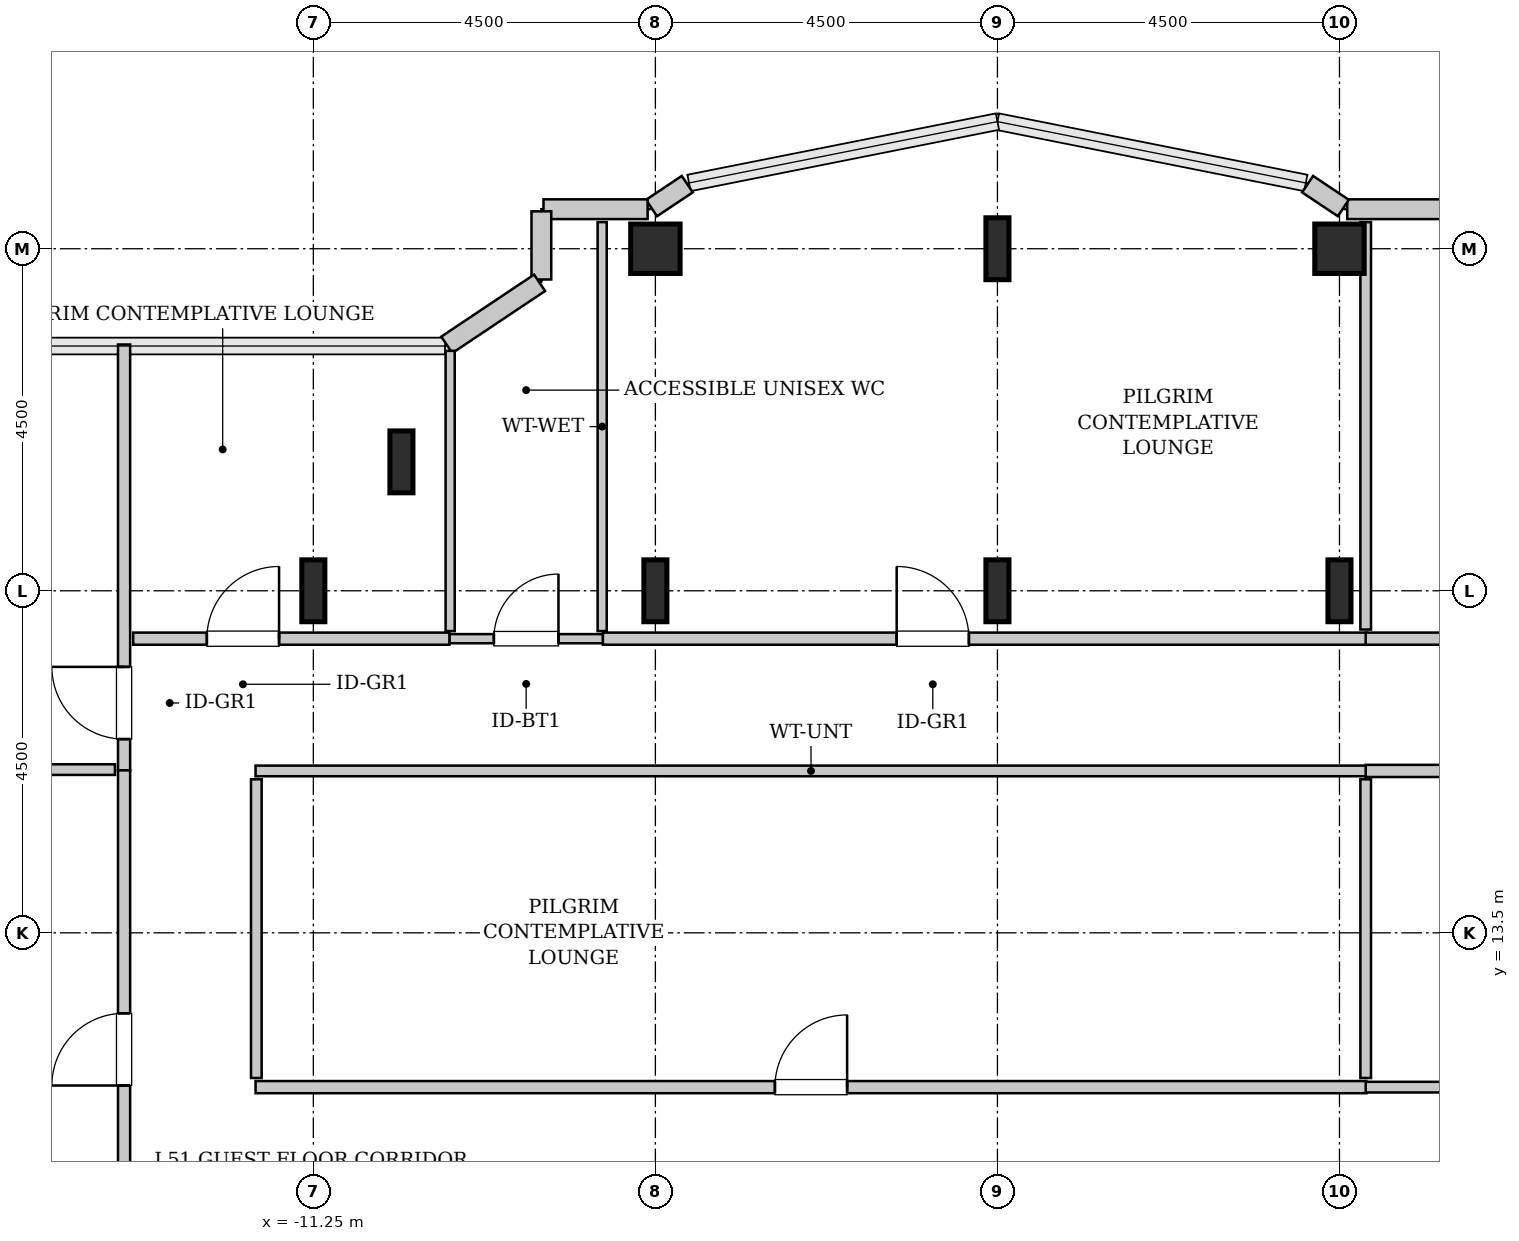
"""IFC4 building model, lengths in metres.
Left out: names, types, materials, properties, quantities, classifications, styles, units other than length and angle.
Written with IfcOpenShell. Run it as: python <this file> out.ifc"""

import sys

from ifc_helpers import new_model, si_unit, direction, frame, frame_2d, origin, origin_2d, place, context, subcontext, project, spatial, rectangle, hollow_rectangle, i_section, extrude, source, transform, mapped, element, fill, save


model = new_model("IFC4")
c1 = context("Model", 3, precision=1e-05, world=origin(), true_north=direction((0.0, 1.0)))
c2 = subcontext(c1, "Body", "Model", "MODEL_VIEW")
j1 = project(units=[si_unit("LENGTHUNIT", "METRE"), si_unit("PLANEANGLEUNIT", "RADIAN")], contexts=[c1])
p1 = place(None, origin())
s1 = spatial("IfcSite", under=j1, at=p1, CompositionType="ELEMENT")
p2 = place(p1, origin())
s2 = spatial("IfcBuilding", under=s1, at=p2, CompositionType="ELEMENT")
p3 = place(p2, frame((0.0, 0.0, 206.6)))
s3 = spatial("IfcBuildingStorey", under=s2, at=p3, CompositionType="ELEMENT", Elevation=206.6)
m1 = source(origin(), c2, "Body", "SweptSolid", [
    extrude(i_section(OverallWidth=0.303, OverallDepth=0.814, WebThickness=0.021, FlangeThickness=0.04, FilletRadius=0.03, at=origin_2d()), origin(), (0.0, 0.0, 1.0), 3.8),
])
for number, where, z_axis, x_axis in (
    (1, (-11.25, 18.0, 0.0), (0.0, 0.0, 1.0), (1.0, 0.0, 0.0)),
    (2, (-10.091, 19.696, 0.0), (0.0, 0.0, 1.0), (1.0, 0.0, 0.0)),
    (3, (-6.75, 18.0, 0.0), (0.0, 0.0, 1.0), (1.0, 0.0, 0.0)),
):
    element("IfcColumn", number, at=place(p3, frame(where, z_axis=z_axis, x_axis=x_axis)), inside=s3, PredefinedType="COLUMN", context=c2, shape_type="MappedRepresentation", body=[
        mapped(m1, transform((0.0, 0.0, 0.0), x_axis=(1.0, 0.0, 0.0), y_axis=(0.0, 1.0, 0.0), z_axis=(0.0, 0.0, 1.0), scale=1.0)),
    ])
m2 = source(origin(), c2, "Body", "SweptSolid", [
    extrude(hollow_rectangle(XDim=0.65, YDim=0.65, WallThickness=0.032, InnerFilletRadius=0.032, OuterFilletRadius=0.064, at=origin_2d()), origin(), (0.0, 0.0, 1.0), 3.8),
])
p4 = place(p3, frame((-6.75, 22.5, 0.0), z_axis=(0.0, 0.0, 1.0), x_axis=(1.0, 0.0, 0.0)))
e4 = element("IfcColumn", 4, at=p4, inside=s3, PredefinedType="COLUMN", context=c2, shape_type="MappedRepresentation", body=[
    mapped(m2, transform((0.0, 0.0, 0.0), x_axis=(1.0, 0.0, 0.0), y_axis=(0.0, 1.0, 0.0), z_axis=(0.0, 0.0, 1.0), scale=1.0)),
])
for number, where, z_axis, x_axis in (
    (5, (-2.25, 18.0, 0.0), (0.0, 0.0, 1.0), (1.0, 0.0, 0.0)),
    (6, (-2.25, 22.5, 0.0), (0.0, 0.0, 1.0), (1.0, 0.0, 0.0)),
    (7, (2.25, 18.0, 0.0), (0.0, 0.0, 1.0), (1.0, 0.0, 0.0)),
):
    element("IfcColumn", number, at=place(p3, frame(where, z_axis=z_axis, x_axis=x_axis)), inside=s3, PredefinedType="COLUMN", context=c2, shape_type="MappedRepresentation", body=[
        mapped(m1, transform((0.0, 0.0, 0.0), x_axis=(1.0, 0.0, 0.0), y_axis=(0.0, 1.0, 0.0), z_axis=(0.0, 0.0, 1.0), scale=1.0)),
    ])
p5 = place(p3, frame((2.25, 22.5, 0.0), z_axis=(0.0, 0.0, 1.0), x_axis=(1.0, 0.0, 0.0)))
e8 = element("IfcColumn", 8, at=p5, inside=s3, PredefinedType="COLUMN", context=c2, shape_type="MappedRepresentation", body=[
    mapped(m2, transform((0.0, 0.0, 0.0), x_axis=(1.0, 0.0, 0.0), y_axis=(0.0, 1.0, 0.0), z_axis=(0.0, 0.0, 1.0), scale=1.0)),
])
m3 = source(origin(), c2, "Body", "SweptSolid", [
    extrude(rectangle(XDim=1.37, YDim=0.26, at=frame_2d((0.685, 0.0))), origin(), (0.0, 0.0, 1.0), 3.55),
])
p6 = place(p3, frame((3.722, 23.02, 0.0), z_axis=(0.0, 0.0, 1.0), x_axis=(-1.0, 0.0, 0.0)))
e9 = element("IfcWall", 9, at=p6, inside=s3, PredefinedType="SOLIDWALL", context=c2, shape_type="MappedRepresentation", body=[
    mapped(m3, transform((0.0, 0.0, 0.0), x_axis=(1.0, 0.0, 0.0), y_axis=(0.0, 1.0, 0.0), z_axis=(0.0, 0.0, 1.0), scale=1.0)),
])
m4 = source(origin(), c2, "Body", "SweptSolid", [
    extrude(rectangle(XDim=0.565, YDim=0.26, at=frame_2d((0.283, 0.0))), origin(), (0.0, 0.0, 1.0), 3.55),
])
for number, where, z_axis, x_axis in (
    (10, (2.301, 23.036, 0.0), (0.0, 0.0, 1.0), (-0.832, 0.555, 0.0)),
    (11, (-6.331, 23.35, 0.0), (0.0, 0.0, 1.0), (-0.832, -0.555, 0.0)),
):
    element("IfcWall", number, at=place(p3, frame(where, z_axis=z_axis, x_axis=x_axis)), inside=s3, PredefinedType="SOLIDWALL", context=c2, shape_type="MappedRepresentation", body=[
        mapped(m4, transform((0.0, 0.0, 0.0), x_axis=(1.0, 0.0, 0.0), y_axis=(0.0, 1.0, 0.0), z_axis=(0.0, 0.0, 1.0), scale=1.0)),
    ])
p7 = place(p3, frame((-6.852, 23.02, 0.0), z_axis=(0.0, 0.0, 1.0), x_axis=(-1.0, 0.0, 0.0)))
e12 = element("IfcWall", 12, at=p7, inside=s3, PredefinedType="SOLIDWALL", context=c2, shape_type="MappedRepresentation", body=[
    mapped(m3, transform((0.0, 0.0, 0.0), x_axis=(1.0, 0.0, 0.0), y_axis=(0.0, 1.0, 0.0), z_axis=(0.0, 0.0, 1.0), scale=1.0)),
])
m5 = source(origin(), c2, "Body", "SweptSolid", [
    extrude(rectangle(XDim=0.897, YDim=0.26, at=frame_2d((0.448, 0.0))), origin(), (0.0, 0.0, 1.0), 3.55),
])
p8 = place(p3, frame((-8.25, 22.992, 0.0), z_axis=(0.0, 0.0, 1.0), x_axis=(0.0, -1.0, 0.0)))
e13 = element("IfcWall", 13, at=p8, inside=s3, PredefinedType="SOLIDWALL", context=c2, shape_type="MappedRepresentation", body=[
    mapped(m5, transform((0.0, 0.0, 0.0), x_axis=(1.0, 0.0, 0.0), y_axis=(0.0, 1.0, 0.0), z_axis=(0.0, 0.0, 1.0), scale=1.0)),
])
m6 = source(origin(), c2, "Body", "SweptSolid", [
    extrude(rectangle(XDim=1.469, YDim=0.26, at=frame_2d((0.734, 0.0))), origin(), (0.0, 0.0, 1.0), 3.55),
])
p9 = place(p3, frame((-8.273, 22.052, 0.0), z_axis=(0.0, 0.0, 1.0), x_axis=(-0.831461760506, -0.555581983884, 0.0)))
e14 = element("IfcWall", 14, at=p9, inside=s3, PredefinedType="SOLIDWALL", context=c2, shape_type="MappedRepresentation", body=[
    mapped(m6, transform((0.0, 0.0, 0.0), x_axis=(1.0, 0.0, 0.0), y_axis=(0.0, 1.0, 0.0), z_axis=(0.0, 0.0, 1.0), scale=1.0)),
])
m7 = source(origin(), c2, "Body", "SweptSolid", [
    extrude(rectangle(XDim=2.02, YDim=0.12, at=frame_2d((1.01, 0.0))), origin(), (0.0, 0.0, 1.0), 3.535),
])
p10 = place(p3, frame((-9.46, 17.37, 0.0), z_axis=(0.0, 0.0, 1.0), x_axis=(1.0, 0.0, 0.0)))
e15 = element("IfcWall", 15, at=p10, inside=s3, PredefinedType="PLUMBINGWALL", context=c2, shape_type="MappedRepresentation", body=[
    mapped(m7, transform((0.0, 0.0, 0.0), x_axis=(1.0, 0.0, 0.0), y_axis=(0.0, 1.0, 0.0), z_axis=(0.0, 0.0, 1.0), scale=1.0)),
])
p11 = place(p10, frame((0.585, 0.0, 0.0)))
e16 = element("IfcOpeningElement", 16, at=p11, cuts=e15, PredefinedType="OPENING", context=c2, shape_type="SweptSolid", body=[
    extrude(rectangle(XDim=0.85, YDim=2.1, at=frame_2d((0.425, 1.05))), frame((0.0, 0.07, 0.0), z_axis=(0.0, -1.0, 0.0), x_axis=(1.0, 0.0, 0.0)), (0.0, 0.0, 1.0), 0.14),
])
m8 = source(origin(), c2, "Body", "SweptSolid", [
    extrude(rectangle(XDim=5.38, YDim=0.12, at=frame_2d((2.69, 0.0))), origin(), (0.0, 0.0, 1.0), 3.535),
])
p12 = place(p3, frame((-7.45, 17.47, 0.0), z_axis=(0.0, 0.0, 1.0), x_axis=(0.0, 1.0, 0.0)))
e17 = element("IfcWall", 17, at=p12, inside=s3, PredefinedType="PLUMBINGWALL", context=c2, shape_type="MappedRepresentation", body=[
    mapped(m8, transform((0.0, 0.0, 0.0), x_axis=(1.0, 0.0, 0.0), y_axis=(0.0, 1.0, 0.0), z_axis=(0.0, 0.0, 1.0), scale=1.0)),
])
m9 = source(origin(), c2, "Body", "SweptSolid", [
    extrude(rectangle(XDim=3.687, YDim=0.12, at=frame_2d((1.843, 0.0))), origin(), (0.0, 0.0, 1.0), 3.535),
])
p13 = place(p3, frame((-9.45, 17.47, 0.0), z_axis=(0.0, 0.0, 1.0), x_axis=(0.0, 1.0, 0.0)))
e18 = element("IfcWall", 18, at=p13, inside=s3, PredefinedType="PLUMBINGWALL", context=c2, shape_type="MappedRepresentation", body=[
    mapped(m9, transform((0.0, 0.0, 0.0), x_axis=(1.0, 0.0, 0.0), y_axis=(0.0, 1.0, 0.0), z_axis=(0.0, 0.0, 1.0), scale=1.0)),
])
m10 = source(origin(), c2, "Body", "SweptSolid", [
    extrude(rectangle(XDim=5.603, YDim=0.16, at=frame_2d((2.801, 0.0))), origin(), (0.0, 0.0, 1.0), 3.535),
])
p14 = place(p3, frame((-13.74, 15.637, 0.0), z_axis=(0.0, 0.0, 1.0), x_axis=(0.0, 1.0, 0.0)))
e19 = element("IfcWall", 19, at=p14, inside=s3, PredefinedType="PARTITIONING", context=c2, shape_type="MappedRepresentation", body=[
    mapped(m10, transform((0.0, 0.0, 0.0), x_axis=(1.0, 0.0, 0.0), y_axis=(0.0, 1.0, 0.0), z_axis=(0.0, 0.0, 1.0), scale=1.0)),
])
p15 = place(p14, frame((0.411, 0.0, 0.0)))
e20 = element("IfcOpeningElement", 20, at=p15, cuts=e19, PredefinedType="OPENING", context=c2, shape_type="SweptSolid", body=[
    extrude(rectangle(XDim=0.95, YDim=2.1, at=frame_2d((0.475, 1.05))), frame((0.0, 0.09, 0.0), z_axis=(0.0, -1.0, 0.0), x_axis=(1.0, 0.0, 0.0)), (0.0, 0.0, 1.0), 0.18),
])
m11 = source(origin(), c2, "Body", "SweptSolid", [
    extrude(rectangle(XDim=11.43, YDim=0.14, at=frame_2d((5.715, 0.0))), origin(), (0.0, 0.0, 1.0), 3.535),
])
p16 = place(p3, frame((-25.29, 15.647, 0.0), z_axis=(0.0, 0.0, 1.0), x_axis=(1.0, 0.0, 0.0)))
e21 = element("IfcWall", 21, at=p16, inside=s3, PredefinedType="PARTITIONING", context=c2, shape_type="MappedRepresentation", body=[
    mapped(m11, transform((0.0, 0.0, 0.0), x_axis=(1.0, 0.0, 0.0), y_axis=(0.0, 1.0, 0.0), z_axis=(0.0, 0.0, 1.0), scale=1.0)),
])
m12 = source(origin(), c2, "Body", "SweptSolid", [
    extrude(rectangle(XDim=7.343, YDim=0.16, at=frame_2d((3.671, 0.0))), origin(), (0.0, 0.0, 1.0), 3.535),
])
p17 = place(p3, frame((-13.74, 8.295, 0.0), z_axis=(0.0, 0.0, 1.0), x_axis=(0.0, 1.0, 0.0)))
e22 = element("IfcWall", 22, at=p17, inside=s3, PredefinedType="PARTITIONING", context=c2, shape_type="MappedRepresentation", body=[
    mapped(m12, transform((0.0, 0.0, 0.0), x_axis=(1.0, 0.0, 0.0), y_axis=(0.0, 1.0, 0.0), z_axis=(0.0, 0.0, 1.0), scale=1.0)),
])
p18 = place(p17, frame((3.196, 0.0, 0.0)))
e23 = element("IfcOpeningElement", 23, at=p18, cuts=e22, PredefinedType="OPENING", context=c2, shape_type="SweptSolid", body=[
    extrude(rectangle(XDim=0.95, YDim=2.1, at=frame_2d((0.475, 1.05))), frame((0.0, 0.09, 0.0), z_axis=(0.0, -1.0, 0.0), x_axis=(1.0, 0.0, 0.0)), (0.0, 0.0, 1.0), 0.18),
])
m13 = source(origin(), c2, "Body", "SweptSolid", [
    extrude(rectangle(XDim=14.615, YDim=0.16, at=frame_2d((7.308, 0.0))), origin(), (0.0, 0.0, 1.0), 3.535),
])
p19 = place(p3, frame((-12.01, 11.47, 0.0), z_axis=(0.0, 0.0, 1.0), x_axis=(1.0, 0.0, 0.0)))
e24 = element("IfcWall", 24, at=p19, inside=s3, PredefinedType="PARTITIONING", context=c2, shape_type="MappedRepresentation", body=[
    mapped(m13, transform((0.0, 0.0, 0.0), x_axis=(1.0, 0.0, 0.0), y_axis=(0.0, 1.0, 0.0), z_axis=(0.0, 0.0, 1.0), scale=1.0)),
])
p20 = place(p19, frame((6.833, 0.0, 0.0)))
e25 = element("IfcOpeningElement", 25, at=p20, cuts=e24, PredefinedType="OPENING", context=c2, shape_type="SweptSolid", body=[
    extrude(rectangle(XDim=0.95, YDim=2.1, at=frame_2d((0.475, 1.05))), frame((0.0, 0.09, 0.0), z_axis=(0.0, -1.0, 0.0), x_axis=(1.0, 0.0, 0.0)), (0.0, 0.0, 1.0), 0.18),
])
m14 = source(origin(), c2, "Body", "SweptSolid", [
    extrude(rectangle(XDim=14.615, YDim=0.14, at=frame_2d((7.308, 0.0))), origin(), (0.0, 0.0, 1.0), 3.535),
])
p21 = place(p3, frame((-12.01, 15.63, 0.0), z_axis=(0.0, 0.0, 1.0), x_axis=(1.0, 0.0, 0.0)))
e26 = element("IfcWall", 26, at=p21, inside=s3, PredefinedType="PARTITIONING", context=c2, shape_type="MappedRepresentation", body=[
    mapped(m14, transform((0.0, 0.0, 0.0), x_axis=(1.0, 0.0, 0.0), y_axis=(0.0, 1.0, 0.0), z_axis=(0.0, 0.0, 1.0), scale=1.0)),
])
m15 = source(origin(), c2, "Body", "SweptSolid", [
    extrude(rectangle(XDim=3.93, YDim=0.14, at=frame_2d((1.965, 0.0))), origin(), (0.0, 0.0, 1.0), 3.535),
])
for number, where, z_axis, x_axis in (
    (27, (-12.0, 11.59, 0.0), (0.0, 0.0, 1.0), (0.0, 1.0, 0.0)),
    (28, (2.595, 11.59, 0.0), (0.0, 0.0, 1.0), (0.0, 1.0, 0.0)),
):
    element("IfcWall", number, at=place(p3, frame(where, z_axis=z_axis, x_axis=x_axis)), inside=s3, PredefinedType="PARTITIONING", context=c2, shape_type="MappedRepresentation", body=[
        mapped(m15, transform((0.0, 0.0, 0.0), x_axis=(1.0, 0.0, 0.0), y_axis=(0.0, 1.0, 0.0), z_axis=(0.0, 0.0, 1.0), scale=1.0)),
    ])
m16 = source(origin(), c2, "Body", "SweptSolid", [
    extrude(rectangle(XDim=10.045, YDim=0.16, at=frame_2d((5.022, 0.0))), origin(), (0.0, 0.0, 1.0), 3.535),
])
p22 = place(p3, frame((-7.44, 17.37, 0.0), z_axis=(0.0, 0.0, 1.0), x_axis=(1.0, 0.0, 0.0)))
e29 = element("IfcWall", 29, at=p22, inside=s3, PredefinedType="PARTITIONING", context=c2, shape_type="MappedRepresentation", body=[
    mapped(m16, transform((0.0, 0.0, 0.0), x_axis=(1.0, 0.0, 0.0), y_axis=(0.0, 1.0, 0.0), z_axis=(0.0, 0.0, 1.0), scale=1.0)),
])
p23 = place(p22, frame((3.865, 0.0, 0.0)))
e30 = element("IfcOpeningElement", 30, at=p23, cuts=e29, PredefinedType="OPENING", context=c2, shape_type="SweptSolid", body=[
    extrude(rectangle(XDim=0.95, YDim=2.1, at=frame_2d((0.475, 1.05))), frame((0.0, 0.09, 0.0), z_axis=(0.0, -1.0, 0.0), x_axis=(1.0, 0.0, 0.0)), (0.0, 0.0, 1.0), 0.18),
])
m17 = source(origin(), c2, "Body", "SweptSolid", [
    extrude(rectangle(XDim=5.36, YDim=0.14, at=frame_2d((2.68, 0.0))), origin(), (0.0, 0.0, 1.0), 2.925),
])
p24 = place(p3, frame((2.595, 17.49, 0.0), z_axis=(0.0, 0.0, 1.0), x_axis=(0.0, 1.0, 0.0)))
e31 = element("IfcWall", 31, at=p24, inside=s3, PredefinedType="PARTITIONING", context=c2, shape_type="MappedRepresentation", body=[
    mapped(m17, transform((0.0, 0.0, 0.0), x_axis=(1.0, 0.0, 0.0), y_axis=(0.0, 1.0, 0.0), z_axis=(0.0, 0.0, 1.0), scale=1.0)),
])
m18 = source(origin(), c2, "Body", "SweptSolid", [
    extrude(rectangle(XDim=4.16, YDim=0.16, at=frame_2d((2.08, 0.0))), origin(), (0.0, 0.0, 1.0), 3.535),
])
p25 = place(p3, frame((-13.62, 17.37, 0.0), z_axis=(0.0, 0.0, 1.0), x_axis=(1.0, 0.0, 0.0)))
e32 = element("IfcWall", 32, at=p25, inside=s3, PredefinedType="PARTITIONING", context=c2, shape_type="MappedRepresentation", body=[
    mapped(m18, transform((0.0, 0.0, 0.0), x_axis=(1.0, 0.0, 0.0), y_axis=(0.0, 1.0, 0.0), z_axis=(0.0, 0.0, 1.0), scale=1.0)),
])
p26 = place(p25, frame((0.969, 0.0, 0.0)))
e33 = element("IfcOpeningElement", 33, at=p26, cuts=e32, PredefinedType="OPENING", context=c2, shape_type="SweptSolid", body=[
    extrude(rectangle(XDim=0.95, YDim=2.1, at=frame_2d((0.475, 1.05))), frame((0.0, 0.09, 0.0), z_axis=(0.0, -1.0, 0.0), x_axis=(1.0, 0.0, 0.0)), (0.0, 0.0, 1.0), 0.18),
])
m19 = source(origin(), c2, "Body", "SweptSolid", [
    extrude(rectangle(XDim=5.61, YDim=0.16, at=frame_2d((2.805, 0.0))), origin(), (0.0, 0.0, 1.0), 3.535),
])
p27 = place(p3, frame((2.595, 17.37, 0.0), z_axis=(0.0, 0.0, 1.0), x_axis=(1.0, 0.0, 0.0)))
e34 = element("IfcWall", 34, at=p27, inside=s3, PredefinedType="PARTITIONING", context=c2, shape_type="MappedRepresentation", body=[
    mapped(m19, transform((0.0, 0.0, 0.0), x_axis=(1.0, 0.0, 0.0), y_axis=(0.0, 1.0, 0.0), z_axis=(0.0, 0.0, 1.0), scale=1.0)),
])
p28 = place(p27, frame((2.33, 0.0, 0.0)))
e35 = element("IfcOpeningElement", 35, at=p28, cuts=e34, PredefinedType="OPENING", context=c2, shape_type="SweptSolid", body=[
    extrude(rectangle(XDim=0.95, YDim=2.1, at=frame_2d((0.475, 1.05))), frame((0.0, 0.09, 0.0), z_axis=(0.0, -1.0, 0.0), x_axis=(1.0, 0.0, 0.0)), (0.0, 0.0, 1.0), 0.18),
])
p29 = place(p3, frame((2.595, 15.63, 0.0), z_axis=(0.0, 0.0, 1.0), x_axis=(1.0, 0.0, 0.0)))
e36 = element("IfcWall", 36, at=p29, inside=s3, PredefinedType="PARTITIONING", context=c2, shape_type="MappedRepresentation", body=[
    mapped(m19, transform((0.0, 0.0, 0.0), x_axis=(1.0, 0.0, 0.0), y_axis=(0.0, 1.0, 0.0), z_axis=(0.0, 0.0, 1.0), scale=1.0)),
])
p30 = place(p29, frame((2.33, 0.0, 0.0)))
e37 = element("IfcOpeningElement", 37, at=p30, cuts=e36, PredefinedType="OPENING", context=c2, shape_type="SweptSolid", body=[
    extrude(rectangle(XDim=0.95, YDim=2.1, at=frame_2d((0.475, 1.05))), frame((0.0, 0.09, 0.0), z_axis=(0.0, -1.0, 0.0), x_axis=(1.0, 0.0, 0.0)), (0.0, 0.0, 1.0), 0.18),
])
m20 = source(origin(), c2, "Body", "SweptSolid", [
    extrude(rectangle(XDim=5.61, YDim=0.14, at=frame_2d((2.805, 0.0))), origin(), (0.0, 0.0, 1.0), 3.535),
])
p31 = place(p3, frame((2.595, 11.47, 0.0), z_axis=(0.0, 0.0, 1.0), x_axis=(1.0, 0.0, 0.0)))
e38 = element("IfcWall", 38, at=p31, inside=s3, PredefinedType="PARTITIONING", context=c2, shape_type="MappedRepresentation", body=[
    mapped(m20, transform((0.0, 0.0, 0.0), x_axis=(1.0, 0.0, 0.0), y_axis=(0.0, 1.0, 0.0), z_axis=(0.0, 0.0, 1.0), scale=1.0)),
])
m21 = source(origin(), c2, "Body", "SweptSolid", [
    extrude(rectangle(XDim=0.85, YDim=2.1, at=frame_2d((0.425, 1.05))), frame((0.0, 0.025, 0.0), z_axis=(0.0, -1.0, 0.0), x_axis=(1.0, 0.0, 0.0)), (0.0, 0.0, 1.0), 0.05),
])
p32 = place(p11, origin())
e39 = element("IfcDoor", 39, at=p32, inside=s3, OperationType="SINGLE_SWING_RIGHT", PredefinedType="DOOR", context=c2, shape_type="MappedRepresentation", body=[
    mapped(m21, transform((0.0, 0.0, 0.0), x_axis=(1.0, 0.0, 0.0), y_axis=(0.0, 1.0, 0.0), z_axis=(0.0, 0.0, 1.0), scale=1.0)),
])
fill(e16, e39)
m22 = source(origin(), c2, "Body", "SweptSolid", [
    extrude(rectangle(XDim=0.95, YDim=2.1, at=frame_2d((0.475, 1.05))), frame((0.0, 0.025, 0.0), z_axis=(0.0, -1.0, 0.0), x_axis=(1.0, 0.0, 0.0)), (0.0, 0.0, 1.0), 0.05),
])
p33 = place(p15, origin())
e40 = element("IfcDoor", 40, at=p33, inside=s3, OperationType="SINGLE_SWING_RIGHT", PredefinedType="DOOR", context=c2, shape_type="MappedRepresentation", body=[
    mapped(m22, transform((0.0, 0.0, 0.0), x_axis=(1.0, 0.0, 0.0), y_axis=(0.0, 1.0, 0.0), z_axis=(0.0, 0.0, 1.0), scale=1.0)),
])
fill(e20, e40)
p34 = place(p18, origin())
e41 = element("IfcDoor", 41, at=p34, inside=s3, OperationType="SINGLE_SWING_LEFT", PredefinedType="DOOR", context=c2, shape_type="MappedRepresentation", body=[
    mapped(m22, transform((0.0, 0.0, 0.0), x_axis=(1.0, 0.0, 0.0), y_axis=(0.0, 1.0, 0.0), z_axis=(0.0, 0.0, 1.0), scale=1.0)),
])
fill(e23, e41)
p35 = place(p20, origin())
e42 = element("IfcDoor", 42, at=p35, inside=s3, OperationType="SINGLE_SWING_RIGHT", PredefinedType="DOOR", context=c2, shape_type="MappedRepresentation", body=[
    mapped(m22, transform((0.0, 0.0, 0.0), x_axis=(1.0, 0.0, 0.0), y_axis=(0.0, 1.0, 0.0), z_axis=(0.0, 0.0, 1.0), scale=1.0)),
])
fill(e25, e42)
p36 = place(p23, origin())
e43 = element("IfcDoor", 43, at=p36, inside=s3, OperationType="SINGLE_SWING_LEFT", PredefinedType="DOOR", context=c2, shape_type="MappedRepresentation", body=[
    mapped(m22, transform((0.0, 0.0, 0.0), x_axis=(1.0, 0.0, 0.0), y_axis=(0.0, 1.0, 0.0), z_axis=(0.0, 0.0, 1.0), scale=1.0)),
])
fill(e30, e43)
p37 = place(p26, origin())
e44 = element("IfcDoor", 44, at=p37, inside=s3, OperationType="SINGLE_SWING_RIGHT", PredefinedType="DOOR", context=c2, shape_type="MappedRepresentation", body=[
    mapped(m22, transform((0.0, 0.0, 0.0), x_axis=(1.0, 0.0, 0.0), y_axis=(0.0, 1.0, 0.0), z_axis=(0.0, 0.0, 1.0), scale=1.0)),
])
fill(e33, e44)
save(model, sys.argv[1])
